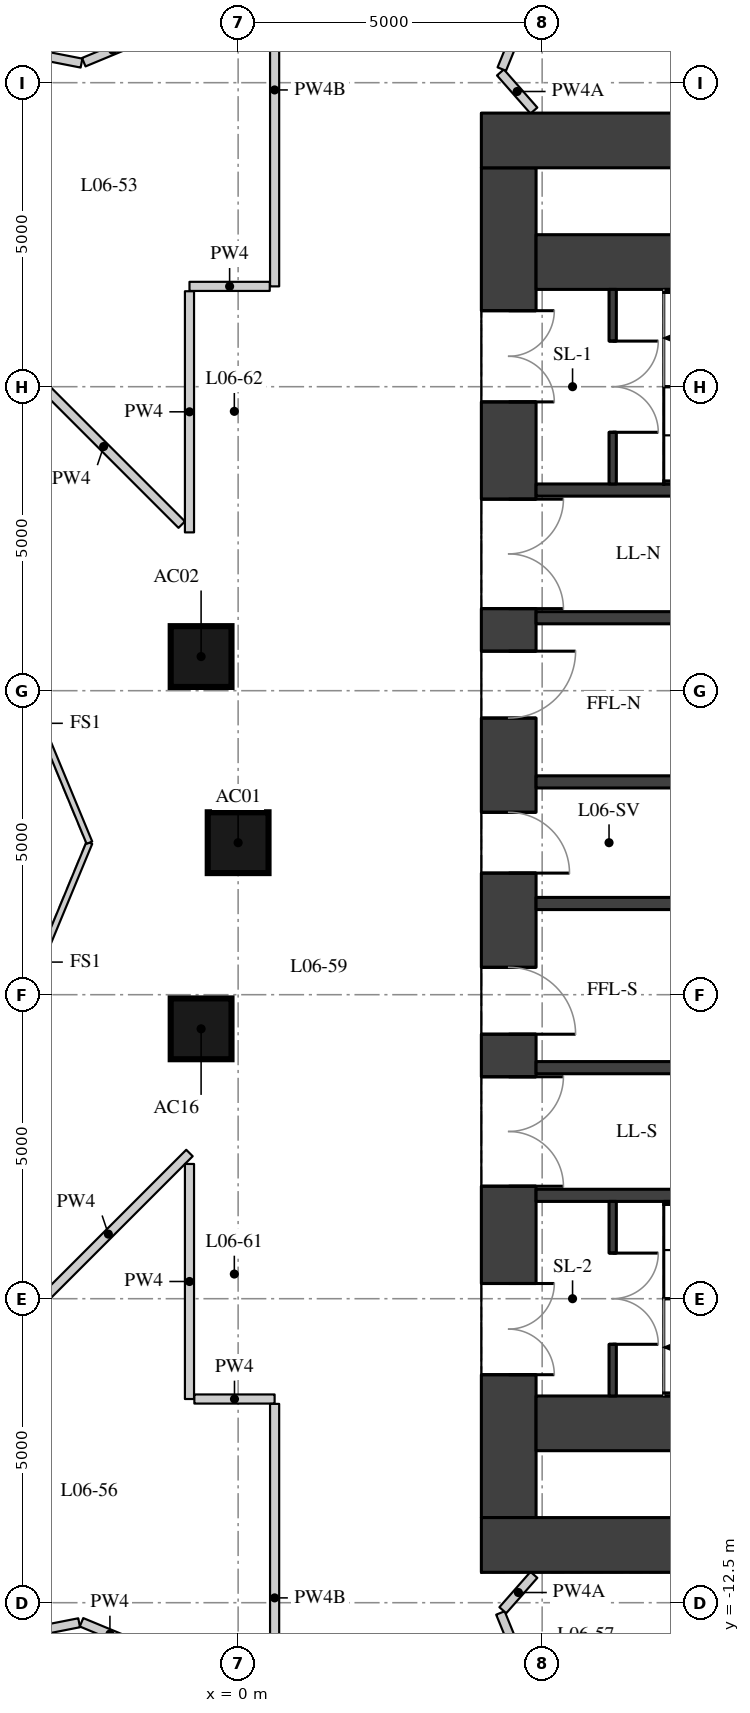
"""IFC4 building model, lengths in metres.
Left out: names, types, materials, properties, quantities, classifications, styles, units other than length and angle.
Written with IfcOpenShell. Run it as: python <this file> out.ifc"""

import sys

from ifc_helpers import new_model, si_unit, direction, frame, frame_2d, origin, origin_2d, place, context, subcontext, project, spatial, rectangle, extrude, element, fill, save


model = new_model("IFC4")
c1 = context("Model", 3, precision=1e-05, world=origin(), true_north=direction((0.0, 1.0)))
c2 = subcontext(c1, "Body", "Model", "MODEL_VIEW")
j1 = project(units=[si_unit("LENGTHUNIT", "METRE"), si_unit("PLANEANGLEUNIT", "RADIAN")], contexts=[c1])
p1 = place(None, origin())
s1 = spatial("IfcSite", under=j1, at=p1, CompositionType="ELEMENT")
p2 = place(p1, origin())
s2 = spatial("IfcBuilding", under=s1, at=p2, CompositionType="ELEMENT")
p3 = place(p2, frame((0.0, 0.0, 28.3)))
s3 = spatial("IfcBuildingStorey", under=s2, at=p3, CompositionType="ELEMENT", Elevation=28.3)
for number, where, z_axis, x_axis in (
    (1, (0.0, 0.0, 0.0), (0.0, 0.0, 1.0), (1.0, 0.0, 0.0)),
    (2, (-0.609, 3.062, 0.0), (0.0, 0.0, 1.0), (1.0, 0.0, 0.0)),
    (3, (-0.609, -3.062, 0.0), (0.0, 0.0, 1.0), (1.0, 0.0, 0.0)),
):
    element("IfcColumn", number, at=place(p3, frame(where, z_axis=z_axis, x_axis=x_axis)), inside=s3, PredefinedType="COLUMN", context=c2, shape_type="SweptSolid", body=[
        extrude(rectangle(XDim=1.0, YDim=1.0, at=origin_2d()), origin(), (0.0, 0.0, 1.0), 3.3),
    ])
p4 = place(p3, frame((4.45, -11.1, 0.0), z_axis=(0.0, 0.0, 1.0), x_axis=(0.0, 1.0, 0.0)))
e4 = element("IfcWall", 4, at=p4, inside=s3, PredefinedType="SHEAR", context=c2, shape_type="SweptSolid", body=[
    extrude(rectangle(XDim=22.2, YDim=0.9, at=frame_2d((11.1, 0.0))), origin(), (0.0, 0.0, 1.0), 3.02),
])
p5 = place(p4, frame((2.35, 0.0, 0.0)))
e5 = element("IfcOpeningElement", 5, at=p5, cuts=e4, PredefinedType="OPENING", context=c2, shape_type="SweptSolid", body=[
    extrude(rectangle(XDim=1.5, YDim=2.1, at=frame_2d((0.75, 1.05))), frame((0.0, 0.46, 0.0), z_axis=(0.0, -1.0, 0.0), x_axis=(1.0, 0.0, 0.0)), (0.0, 0.0, 1.0), 0.92),
])
p6 = place(p4, frame((5.45, 0.0, 0.0)))
e6 = element("IfcOpeningElement", 6, at=p6, cuts=e4, PredefinedType="OPENING", context=c2, shape_type="SweptSolid", body=[
    extrude(rectangle(XDim=1.8, YDim=2.1, at=frame_2d((0.9, 1.05))), frame((0.0, 0.46, 0.0), z_axis=(0.0, -1.0, 0.0), x_axis=(1.0, 0.0, 0.0)), (0.0, 0.0, 1.0), 0.92),
])
p7 = place(p4, frame((7.95, 0.0, 0.0)))
e7 = element("IfcOpeningElement", 7, at=p7, cuts=e4, PredefinedType="OPENING", context=c2, shape_type="SweptSolid", body=[
    extrude(rectangle(XDim=1.1, YDim=2.1, at=frame_2d((0.55, 1.05))), frame((0.0, 0.46, 0.0), z_axis=(0.0, -1.0, 0.0), x_axis=(1.0, 0.0, 0.0)), (0.0, 0.0, 1.0), 0.92),
])
p8 = place(p4, frame((10.6, 0.0, 0.0)))
e8 = element("IfcOpeningElement", 8, at=p8, cuts=e4, PredefinedType="OPENING", context=c2, shape_type="SweptSolid", body=[
    extrude(rectangle(XDim=1.0, YDim=2.1, at=frame_2d((0.5, 1.05))), frame((0.0, 0.46, 0.0), z_axis=(0.0, -1.0, 0.0), x_axis=(1.0, 0.0, 0.0)), (0.0, 0.0, 1.0), 0.92),
])
p9 = place(p4, frame((13.15, 0.0, 0.0)))
e9 = element("IfcOpeningElement", 9, at=p9, cuts=e4, PredefinedType="OPENING", context=c2, shape_type="SweptSolid", body=[
    extrude(rectangle(XDim=1.1, YDim=2.1, at=frame_2d((0.55, 1.05))), frame((0.0, 0.46, 0.0), z_axis=(0.0, -1.0, 0.0), x_axis=(1.0, 0.0, 0.0)), (0.0, 0.0, 1.0), 0.92),
])
p10 = place(p4, frame((14.95, 0.0, 0.0)))
e10 = element("IfcOpeningElement", 10, at=p10, cuts=e4, PredefinedType="OPENING", context=c2, shape_type="SweptSolid", body=[
    extrude(rectangle(XDim=1.8, YDim=2.1, at=frame_2d((0.9, 1.05))), frame((0.0, 0.46, 0.0), z_axis=(0.0, -1.0, 0.0), x_axis=(1.0, 0.0, 0.0)), (0.0, 0.0, 1.0), 0.92),
])
p11 = place(p4, frame((18.35, 0.0, 0.0)))
e11 = element("IfcOpeningElement", 11, at=p11, cuts=e4, PredefinedType="OPENING", context=c2, shape_type="SweptSolid", body=[
    extrude(rectangle(XDim=1.5, YDim=2.1, at=frame_2d((0.75, 1.05))), frame((0.0, 0.46, 0.0), z_axis=(0.0, -1.0, 0.0), x_axis=(1.0, 0.0, 0.0)), (0.0, 0.0, 1.0), 0.92),
])
for number, where, z_axis, x_axis in (
    (12, (4.0, 11.55, 0.0), (0.0, 0.0, 1.0), (1.0, 0.0, 0.0)),
    (13, (4.0, -11.55, 0.0), (0.0, 0.0, 1.0), (1.0, 0.0, 0.0)),
):
    element("IfcWall", number, at=place(p3, frame(where, z_axis=z_axis, x_axis=x_axis)), inside=s3, PredefinedType="SHEAR", context=c2, shape_type="SweptSolid", body=[
        extrude(rectangle(XDim=15.2, YDim=0.9, at=frame_2d((7.6, 0.0))), origin(), (0.0, 0.0, 1.0), 3.02),
    ])
for number, where, z_axis, x_axis in (
    (14, (4.9, 9.55, 0.0), (0.0, 0.0, 1.0), (1.0, 0.0, 0.0)),
    (15, (4.9, -9.55, 0.0), (0.0, 0.0, 1.0), (1.0, 0.0, 0.0)),
):
    element("IfcWall", number, at=place(p3, frame(where, z_axis=z_axis, x_axis=x_axis)), inside=s3, PredefinedType="SHEAR", context=c2, shape_type="SweptSolid", body=[
        extrude(rectangle(XDim=10.2, YDim=0.9, at=frame_2d((5.1, 0.0))), origin(), (0.0, 0.0, 1.0), 3.02),
    ])
p12 = place(p3, frame((4.9, 5.8, 0.0), z_axis=(0.0, 0.0, 1.0), x_axis=(1.0, 0.0, 0.0)))
e16 = element("IfcWall", 16, at=p12, inside=s3, PredefinedType="SHEAR", context=c2, shape_type="SweptSolid", body=[
    extrude(rectangle(XDim=10.2, YDim=0.2, at=frame_2d((5.1, 0.0))), origin(), (0.0, 0.0, 1.0), 3.02),
])
p13 = place(p12, frame((6.75, 0.0, 0.0)))
e17 = element("IfcOpeningElement", 17, at=p13, cuts=e16, PredefinedType="OPENING", context=c2, shape_type="SweptSolid", body=[
    extrude(rectangle(XDim=1.1, YDim=2.1, at=frame_2d((0.55, 1.05))), frame((0.0, 0.11, 0.0), z_axis=(0.0, -1.0, 0.0), x_axis=(1.0, 0.0, 0.0)), (0.0, 0.0, 1.0), 0.22),
])
p14 = place(p12, frame((8.75, 0.0, 0.0)))
e18 = element("IfcOpeningElement", 18, at=p14, cuts=e16, PredefinedType="OPENING", context=c2, shape_type="SweptSolid", body=[
    extrude(rectangle(XDim=1.1, YDim=2.1, at=frame_2d((0.55, 1.05))), frame((0.0, 0.11, 0.0), z_axis=(0.0, -1.0, 0.0), x_axis=(1.0, 0.0, 0.0)), (0.0, 0.0, 1.0), 0.22),
])
p15 = place(p3, frame((4.9, 3.7, 0.0), z_axis=(0.0, 0.0, 1.0), x_axis=(1.0, 0.0, 0.0)))
e19 = element("IfcWall", 19, at=p15, inside=s3, PredefinedType="SHEAR", context=c2, shape_type="SweptSolid", body=[
    extrude(rectangle(XDim=10.2, YDim=0.2, at=frame_2d((5.1, 0.0))), origin(), (0.0, 0.0, 1.0), 3.02),
])
p16 = place(p15, frame((6.3, 0.0, 0.0)))
e20 = element("IfcOpeningElement", 20, at=p16, cuts=e19, PredefinedType="OPENING", context=c2, shape_type="SweptSolid", body=[
    extrude(rectangle(XDim=1.1, YDim=2.1, at=frame_2d((0.55, 1.05))), frame((0.0, 0.11, 0.0), z_axis=(0.0, -1.0, 0.0), x_axis=(1.0, 0.0, 0.0)), (0.0, 0.0, 1.0), 0.22),
])
p17 = place(p15, frame((8.6, 0.0, 0.0)))
e21 = element("IfcOpeningElement", 21, at=p17, cuts=e19, PredefinedType="OPENING", context=c2, shape_type="SweptSolid", body=[
    extrude(rectangle(XDim=1.1, YDim=2.1, at=frame_2d((0.55, 1.05))), frame((0.0, 0.11, 0.0), z_axis=(0.0, -1.0, 0.0), x_axis=(1.0, 0.0, 0.0)), (0.0, 0.0, 1.0), 0.22),
])
for number, where, z_axis, x_axis in (
    (22, (4.9, 1.0, 0.0), (0.0, 0.0, 1.0), (1.0, 0.0, 0.0)),
    (23, (4.9, -1.0, 0.0), (0.0, 0.0, 1.0), (1.0, 0.0, 0.0)),
):
    element("IfcWall", number, at=place(p3, frame(where, z_axis=z_axis, x_axis=x_axis)), inside=s3, PredefinedType="SHEAR", context=c2, shape_type="SweptSolid", body=[
        extrude(rectangle(XDim=10.2, YDim=0.2, at=frame_2d((5.1, 0.0))), origin(), (0.0, 0.0, 1.0), 3.02),
    ])
p18 = place(p3, frame((4.9, -3.7, 0.0), z_axis=(0.0, 0.0, 1.0), x_axis=(1.0, 0.0, 0.0)))
e24 = element("IfcWall", 24, at=p18, inside=s3, PredefinedType="SHEAR", context=c2, shape_type="SweptSolid", body=[
    extrude(rectangle(XDim=10.2, YDim=0.2, at=frame_2d((5.1, 0.0))), origin(), (0.0, 0.0, 1.0), 3.02),
])
p19 = place(p18, frame((6.3, 0.0, 0.0)))
e25 = element("IfcOpeningElement", 25, at=p19, cuts=e24, PredefinedType="OPENING", context=c2, shape_type="SweptSolid", body=[
    extrude(rectangle(XDim=1.1, YDim=2.1, at=frame_2d((0.55, 1.05))), frame((0.0, 0.11, 0.0), z_axis=(0.0, -1.0, 0.0), x_axis=(1.0, 0.0, 0.0)), (0.0, 0.0, 1.0), 0.22),
])
p20 = place(p18, frame((8.6, 0.0, 0.0)))
e26 = element("IfcOpeningElement", 26, at=p20, cuts=e24, PredefinedType="OPENING", context=c2, shape_type="SweptSolid", body=[
    extrude(rectangle(XDim=1.1, YDim=2.1, at=frame_2d((0.55, 1.05))), frame((0.0, 0.11, 0.0), z_axis=(0.0, -1.0, 0.0), x_axis=(1.0, 0.0, 0.0)), (0.0, 0.0, 1.0), 0.22),
])
p21 = place(p3, frame((4.9, -5.8, 0.0), z_axis=(0.0, 0.0, 1.0), x_axis=(1.0, 0.0, 0.0)))
e27 = element("IfcWall", 27, at=p21, inside=s3, PredefinedType="SHEAR", context=c2, shape_type="SweptSolid", body=[
    extrude(rectangle(XDim=10.2, YDim=0.2, at=frame_2d((5.1, 0.0))), origin(), (0.0, 0.0, 1.0), 3.02),
])
p22 = place(p3, frame((6.16, 5.9, 0.0), z_axis=(0.0, 0.0, 1.0), x_axis=(0.0, 1.0, 0.0)))
e28 = element("IfcWall", 28, at=p22, inside=s3, PredefinedType="SHEAR", context=c2, shape_type="SweptSolid", body=[
    extrude(rectangle(XDim=3.2, YDim=0.12, at=frame_2d((1.6, 0.0))), origin(), (0.0, 0.0, 1.0), 3.02),
])
p23 = place(p22, frame((0.85, 0.0, 0.0)))
e29 = element("IfcOpeningElement", 29, at=p23, cuts=e28, PredefinedType="OPENING", context=c2, shape_type="SweptSolid", body=[
    extrude(rectangle(XDim=1.5, YDim=2.1, at=frame_2d((0.75, 1.05))), frame((0.0, 0.07, 0.0), z_axis=(0.0, -1.0, 0.0), x_axis=(1.0, 0.0, 0.0)), (0.0, 0.0, 1.0), 0.14),
])
p24 = place(p3, frame((6.16, -9.1, 0.0), z_axis=(0.0, 0.0, 1.0), x_axis=(0.0, 1.0, 0.0)))
e30 = element("IfcWall", 30, at=p24, inside=s3, PredefinedType="SHEAR", context=c2, shape_type="SweptSolid", body=[
    extrude(rectangle(XDim=3.2, YDim=0.12, at=frame_2d((1.6, 0.0))), origin(), (0.0, 0.0, 1.0), 3.02),
])
p25 = place(p24, frame((0.85, 0.0, 0.0)))
e31 = element("IfcOpeningElement", 31, at=p25, cuts=e30, PredefinedType="OPENING", context=c2, shape_type="SweptSolid", body=[
    extrude(rectangle(XDim=1.5, YDim=2.1, at=frame_2d((0.75, 1.05))), frame((0.0, 0.07, 0.0), z_axis=(0.0, -1.0, 0.0), x_axis=(1.0, 0.0, 0.0)), (0.0, 0.0, 1.0), 0.14),
])
p26 = place(p3, frame((0.6, 15.612, 0.0), z_axis=(0.0, 0.0, 1.0), x_axis=(0.0, -1.0, 0.0)))
e32 = element("IfcWall", 32, at=p26, inside=s3, PredefinedType="PARTITIONING", context=c2, shape_type="SweptSolid", body=[
    extrude(rectangle(XDim=6.462, YDim=0.15, at=frame_2d((3.231, 0.0))), origin(), (0.0, 0.0, 1.0), 2.47),
])
p27 = place(p3, frame((0.52, 9.15, 0.0), z_axis=(0.0, 0.0, 1.0), x_axis=(-1.0, 0.0, 0.0)))
e33 = element("IfcWall", 33, at=p27, inside=s3, PredefinedType="PARTITIONING", context=c2, shape_type="SweptSolid", body=[
    extrude(rectangle(XDim=1.32, YDim=0.15, at=frame_2d((0.66, 0.0))), origin(), (0.0, 0.0, 1.0), 3.02),
])
p28 = place(p3, frame((-0.8, 9.07, 0.0), z_axis=(0.0, 0.0, 1.0), x_axis=(0.0, -1.0, 0.0)))
e34 = element("IfcWall", 34, at=p28, inside=s3, PredefinedType="PARTITIONING", context=c2, shape_type="SweptSolid", body=[
    extrude(rectangle(XDim=3.966, YDim=0.15, at=frame_2d((1.983, 0.0))), origin(), (0.0, 0.0, 1.0), 3.02),
])
p29 = place(p3, frame((-0.927, 5.231, 0.0), z_axis=(0.0, 0.0, 1.0), x_axis=(-0.707106781187, 0.707106781187, 0.0)))
e35 = element("IfcWall", 35, at=p29, inside=s3, PredefinedType="PARTITIONING", context=c2, shape_type="SweptSolid", body=[
    extrude(rectangle(XDim=3.633, YDim=0.15, at=frame_2d((1.817, 0.0))), origin(), (0.0, 0.0, 1.0), 3.02),
])
p30 = place(p3, frame((-4.607, 13.22, 0.0), z_axis=(0.0, 0.0, 1.0), x_axis=(0.981304142817, -0.192463449234, 0.0)))
e36 = element("IfcWall", 36, at=p30, inside=s3, PredefinedType="PARTITIONING", context=c2, shape_type="SweptSolid", body=[
    extrude(rectangle(XDim=2.07, YDim=0.15, at=frame_2d((1.035, 0.0))), origin(), (0.0, 0.0, 1.0), 3.02),
])
p31 = place(p3, frame((-2.539, 12.837, 0.0), z_axis=(0.0, 0.0, 1.0), x_axis=(0.923768662954, 0.382950985565, 0.0)))
e37 = element("IfcWall", 37, at=p31, inside=s3, PredefinedType="PARTITIONING", context=c2, shape_type="SweptSolid", body=[
    extrude(rectangle(XDim=1.031, YDim=0.15, at=frame_2d((0.516, 0.0))), origin(), (0.0, 0.0, 1.0), 3.02),
])
p32 = place(p3, frame((4.865, 12.042, 0.0), z_axis=(0.0, 0.0, 1.0), x_axis=(-0.660014599896, 0.751252772323, 0.0)))
e38 = element("IfcWall", 38, at=p32, inside=s3, PredefinedType="PARTITIONING", context=c2, shape_type="SweptSolid", body=[
    extrude(rectangle(XDim=0.835, YDim=0.15, at=frame_2d((0.417, 0.0))), origin(), (0.0, 0.0, 1.0), 2.57),
])
p33 = place(p3, frame((4.336, 12.724, 0.0), z_axis=(0.0, 0.0, 1.0), x_axis=(0.376897652409, 0.926254910707, 0.0)))
e39 = element("IfcWall", 39, at=p33, inside=s3, PredefinedType="PARTITIONING", context=c2, shape_type="SweptSolid", body=[
    extrude(rectangle(XDim=1.962, YDim=0.15, at=frame_2d((0.981, 0.0))), origin(), (0.0, 0.0, 1.0), 3.02),
])
p34 = place(p3, frame((-1.641, -13.209, 0.0), z_axis=(0.0, 0.0, 1.0), x_axis=(-0.923725449546, 0.383055209937, 0.0)))
e40 = element("IfcWall", 40, at=p34, inside=s3, PredefinedType="PARTITIONING", context=c2, shape_type="SweptSolid", body=[
    extrude(rectangle(XDim=1.011, YDim=0.15, at=frame_2d((0.506, 0.0))), origin(), (0.0, 0.0, 1.0), 3.02),
])
p35 = place(p3, frame((-2.615, -12.83, 0.0), z_axis=(0.0, 0.0, 1.0), x_axis=(-0.981297312652, -0.192498270593, 0.0)))
e41 = element("IfcWall", 41, at=p35, inside=s3, PredefinedType="PARTITIONING", context=c2, shape_type="SweptSolid", body=[
    extrude(rectangle(XDim=2.09, YDim=0.15, at=frame_2d((1.045, 0.0))), origin(), (0.0, 0.0, 1.0), 3.02),
])
p36 = place(p3, frame((-3.468, -7.772, 0.0), z_axis=(0.0, 0.0, 1.0), x_axis=(0.707106781187, 0.707106781187, 0.0)))
e42 = element("IfcWall", 42, at=p36, inside=s3, PredefinedType="PARTITIONING", context=c2, shape_type="SweptSolid", body=[
    extrude(rectangle(XDim=3.773, YDim=0.15, at=frame_2d((1.887, 0.0))), origin(), (0.0, 0.0, 1.0), 3.02),
])
p37 = place(p3, frame((-0.8, -5.284, 0.0), z_axis=(0.0, 0.0, 1.0), x_axis=(0.0, -1.0, 0.0)))
e43 = element("IfcWall", 43, at=p37, inside=s3, PredefinedType="PARTITIONING", context=c2, shape_type="SweptSolid", body=[
    extrude(rectangle(XDim=3.866, YDim=0.15, at=frame_2d((1.933, 0.0))), origin(), (0.0, 0.0, 1.0), 3.02),
])
p38 = place(p3, frame((-0.72, -9.15, 0.0), z_axis=(0.0, 0.0, 1.0), x_axis=(1.0, 0.0, 0.0)))
e44 = element("IfcWall", 44, at=p38, inside=s3, PredefinedType="PARTITIONING", context=c2, shape_type="SweptSolid", body=[
    extrude(rectangle(XDim=1.32, YDim=0.15, at=frame_2d((0.66, 0.0))), origin(), (0.0, 0.0, 1.0), 3.02),
])
p39 = place(p3, frame((0.6, -9.23, 0.0), z_axis=(0.0, 0.0, 1.0), x_axis=(0.0, -1.0, 0.0)))
e45 = element("IfcWall", 45, at=p39, inside=s3, PredefinedType="PARTITIONING", context=c2, shape_type="SweptSolid", body=[
    extrude(rectangle(XDim=6.382, YDim=0.15, at=frame_2d((3.191, 0.0))), origin(), (0.0, 0.0, 1.0), 2.47),
])
p40 = place(p3, frame((5.045, -14.468, 0.0), z_axis=(0.0, 0.0, 1.0), x_axis=(-0.376889538578, 0.926258212223, 0.0)))
e46 = element("IfcWall", 46, at=p40, inside=s3, PredefinedType="PARTITIONING", context=c2, shape_type="SweptSolid", body=[
    extrude(rectangle(XDim=1.942, YDim=0.15, at=frame_2d((0.971, 0.0))), origin(), (0.0, 0.0, 1.0), 3.02),
])
p41 = place(p3, frame((4.353, -12.623, 0.0), z_axis=(0.0, 0.0, 1.0), x_axis=(0.660265480509, 0.751032286422, 0.0)))
e47 = element("IfcWall", 47, at=p41, inside=s3, PredefinedType="PARTITIONING", context=c2, shape_type="SweptSolid", body=[
    extrude(rectangle(XDim=0.775, YDim=0.15, at=frame_2d((0.387, 0.0))), origin(), (0.0, 0.0, 1.0), 2.57),
])
for number, where, z_axis, x_axis in (
    (48, (-2.446, 0.0, 0.0), (0.0, 0.0, 1.0), (-0.383, -0.924, 0.0)),
    (49, (-4.073, 3.927, 0.0), (0.0, 0.0, 1.0), (0.383, -0.924, 0.0)),
):
    element("IfcWall", number, at=place(p3, frame(where, z_axis=z_axis, x_axis=x_axis)), inside=s3, PredefinedType="PARTITIONING", context=c2, shape_type="SweptSolid", body=[
        extrude(rectangle(XDim=4.251, YDim=0.1, at=frame_2d((2.125, 0.0))), origin(), (0.0, 0.0, 1.0), 3.02),
    ])
p42 = place(p5, origin())
e50 = element("IfcDoor", 50, at=p42, inside=s3, OperationType="DOUBLE_DOOR_SINGLE_SWING", PredefinedType="DOOR", context=c2, shape_type="SweptSolid", body=[
    extrude(rectangle(XDim=1.5, YDim=2.1, at=frame_2d((0.75, 1.05))), frame((0.0, 0.025, 0.0), z_axis=(0.0, -1.0, 0.0), x_axis=(1.0, 0.0, 0.0)), (0.0, 0.0, 1.0), 0.05),
])
fill(e5, e50)
p43 = place(p6, origin())
e51 = element("IfcDoor", 51, at=p43, inside=s3, OperationType="DOUBLE_DOOR_SINGLE_SWING", PredefinedType="DOOR", context=c2, shape_type="SweptSolid", body=[
    extrude(rectangle(XDim=1.8, YDim=2.1, at=frame_2d((0.9, 1.05))), frame((0.0, 0.025, 0.0), z_axis=(0.0, -1.0, 0.0), x_axis=(1.0, 0.0, 0.0)), (0.0, 0.0, 1.0), 0.05),
])
fill(e6, e51)
p44 = place(p7, origin())
e52 = element("IfcDoor", 52, at=p44, inside=s3, OperationType="SINGLE_SWING_RIGHT", PredefinedType="DOOR", context=c2, shape_type="SweptSolid", body=[
    extrude(rectangle(XDim=1.1, YDim=2.1, at=frame_2d((0.55, 1.05))), frame((0.0, 0.025, 0.0), z_axis=(0.0, -1.0, 0.0), x_axis=(1.0, 0.0, 0.0)), (0.0, 0.0, 1.0), 0.05),
])
fill(e7, e52)
p45 = place(p8, origin())
e53 = element("IfcDoor", 53, at=p45, inside=s3, OperationType="SINGLE_SWING_RIGHT", PredefinedType="DOOR", context=c2, shape_type="SweptSolid", body=[
    extrude(rectangle(XDim=1.0, YDim=2.1, at=frame_2d((0.5, 1.05))), frame((0.0, 0.025, 0.0), z_axis=(0.0, -1.0, 0.0), x_axis=(1.0, 0.0, 0.0)), (0.0, 0.0, 1.0), 0.05),
])
fill(e8, e53)
p46 = place(p9, origin())
e54 = element("IfcDoor", 54, at=p46, inside=s3, OperationType="SINGLE_SWING_LEFT", PredefinedType="DOOR", context=c2, shape_type="SweptSolid", body=[
    extrude(rectangle(XDim=1.1, YDim=2.1, at=frame_2d((0.55, 1.05))), frame((0.0, 0.025, 0.0), z_axis=(0.0, -1.0, 0.0), x_axis=(1.0, 0.0, 0.0)), (0.0, 0.0, 1.0), 0.05),
])
fill(e9, e54)
p47 = place(p10, origin())
e55 = element("IfcDoor", 55, at=p47, inside=s3, OperationType="DOUBLE_DOOR_SINGLE_SWING", PredefinedType="DOOR", context=c2, shape_type="SweptSolid", body=[
    extrude(rectangle(XDim=1.8, YDim=2.1, at=frame_2d((0.9, 1.05))), frame((0.0, 0.025, 0.0), z_axis=(0.0, -1.0, 0.0), x_axis=(1.0, 0.0, 0.0)), (0.0, 0.0, 1.0), 0.05),
])
fill(e10, e55)
p48 = place(p11, origin())
e56 = element("IfcDoor", 56, at=p48, inside=s3, OperationType="DOUBLE_DOOR_SINGLE_SWING", PredefinedType="DOOR", context=c2, shape_type="SweptSolid", body=[
    extrude(rectangle(XDim=1.5, YDim=2.1, at=frame_2d((0.75, 1.05))), frame((0.0, 0.025, 0.0), z_axis=(0.0, -1.0, 0.0), x_axis=(1.0, 0.0, 0.0)), (0.0, 0.0, 1.0), 0.05),
])
fill(e11, e56)
p49 = place(p23, origin())
e57 = element("IfcDoor", 57, at=p49, inside=s3, OperationType="DOUBLE_DOOR_SINGLE_SWING", PredefinedType="DOOR", context=c2, shape_type="SweptSolid", body=[
    extrude(rectangle(XDim=1.5, YDim=2.1, at=frame_2d((0.75, 1.05))), frame((0.0, 0.025, 0.0), z_axis=(0.0, -1.0, 0.0), x_axis=(1.0, 0.0, 0.0)), (0.0, 0.0, 1.0), 0.05),
])
fill(e29, e57)
p50 = place(p25, origin())
e58 = element("IfcDoor", 58, at=p50, inside=s3, OperationType="DOUBLE_DOOR_SINGLE_SWING", PredefinedType="DOOR", context=c2, shape_type="SweptSolid", body=[
    extrude(rectangle(XDim=1.5, YDim=2.1, at=frame_2d((0.75, 1.05))), frame((0.0, 0.025, 0.0), z_axis=(0.0, -1.0, 0.0), x_axis=(1.0, 0.0, 0.0)), (0.0, 0.0, 1.0), 0.05),
])
fill(e31, e58)
save(model, sys.argv[1])
